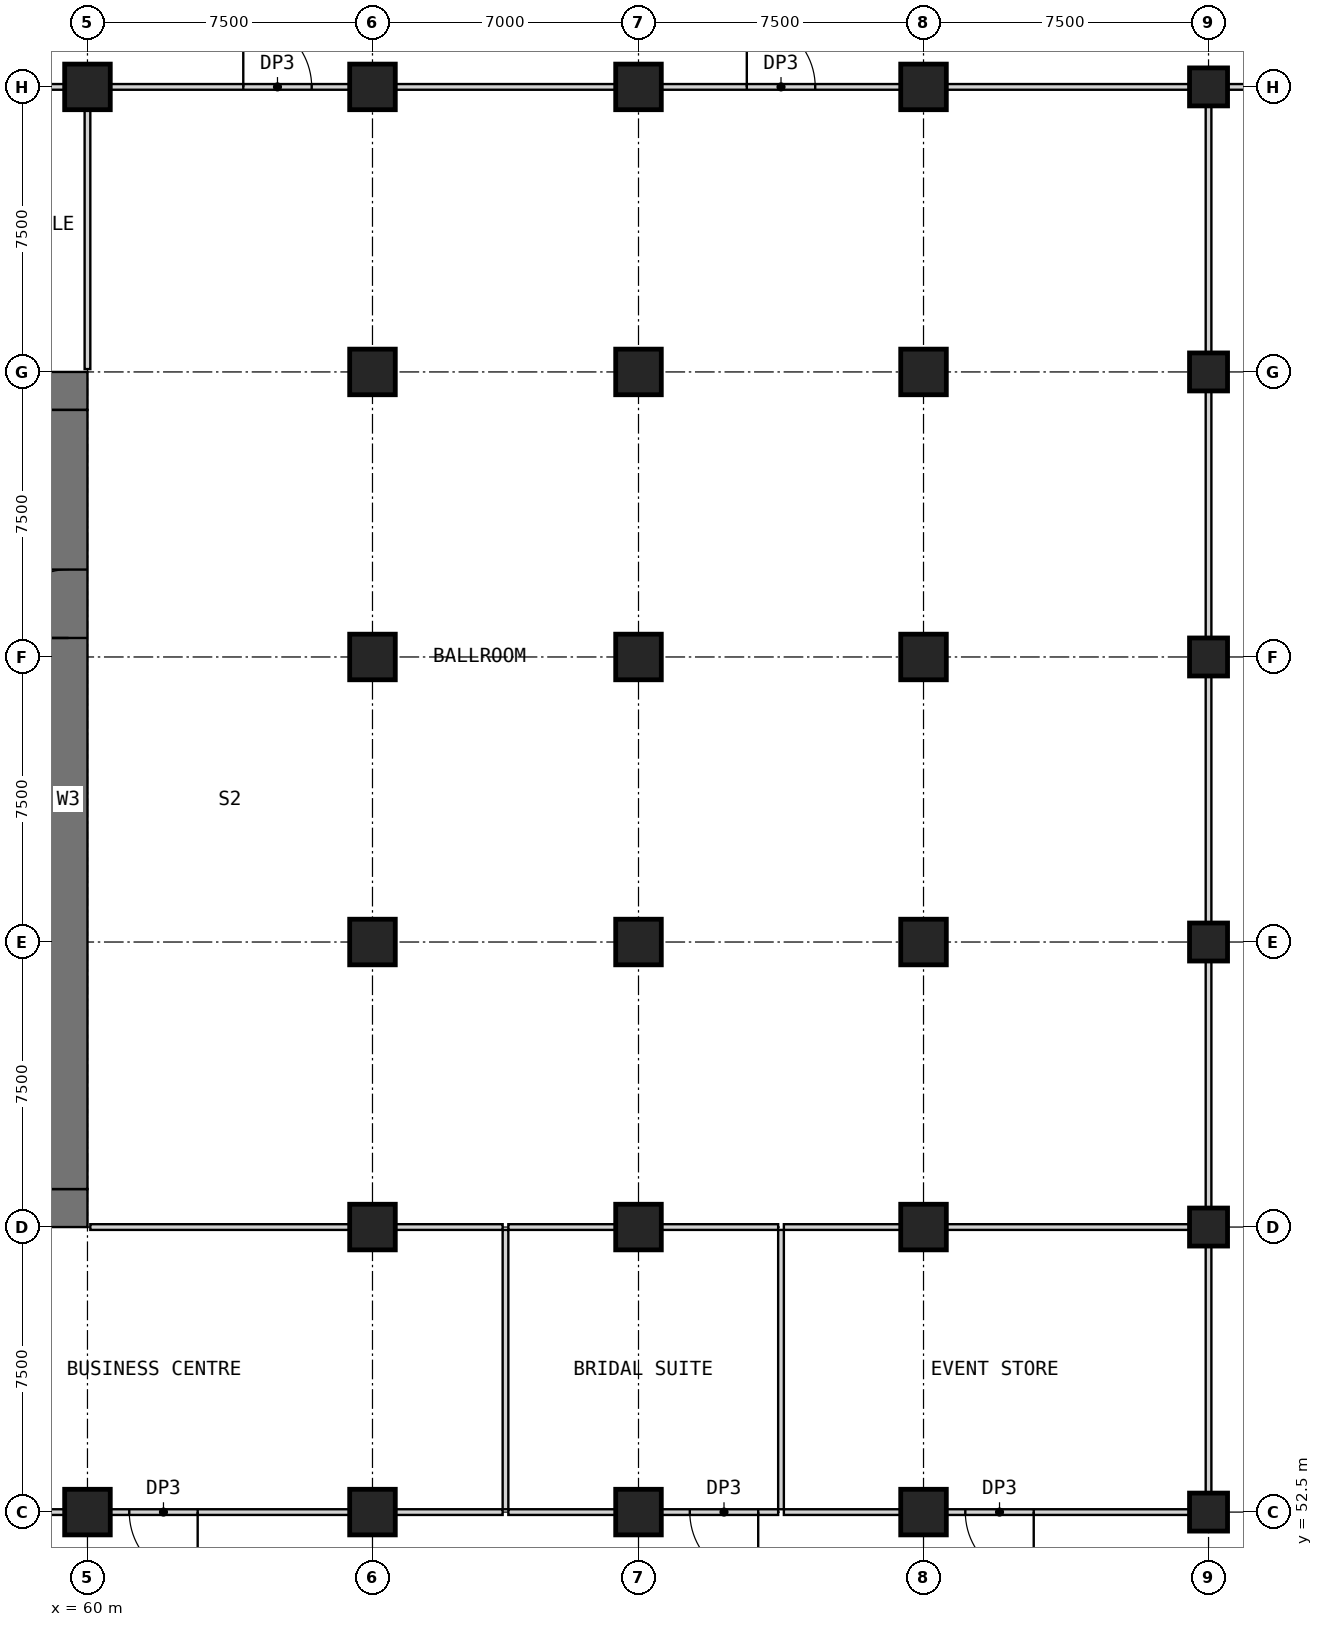
"""IFC4 building model, lengths in metres.
Left out: names, types, materials, properties, quantities, classifications, styles, units other than length and angle.
Written with IfcOpenShell. Run it as: python <this file> out.ifc"""

import sys

from ifc_helpers import new_model, si_unit, direction, frame, frame_2d, origin, origin_2d, place, context, subcontext, project, spatial, rectangle, extrude, element, fill, save


model = new_model("IFC4")
c1 = context("Model", 3, precision=1e-05, world=origin(), true_north=direction((0.0, 1.0)))
c2 = subcontext(c1, "Body", "Model", "MODEL_VIEW")
j1 = project(units=[si_unit("LENGTHUNIT", "METRE"), si_unit("PLANEANGLEUNIT", "RADIAN")], contexts=[c1])
p1 = place(None, origin())
s1 = spatial("IfcSite", under=j1, at=p1, CompositionType="ELEMENT")
p2 = place(p1, origin())
s2 = spatial("IfcBuilding", under=s1, at=p2, CompositionType="ELEMENT")
p3 = place(p2, frame((0.0, 0.0, 23.5)))
s3 = spatial("IfcBuildingStorey", under=s2, at=p3, CompositionType="ELEMENT", Elevation=23.5)
for number, where, z_axis, x_axis in (
    (1, (60.0, 52.5, 0.0), (0.0, 0.0, 1.0), (1.0, 0.0, 0.0)),
    (2, (60.0, 90.0, 0.0), (0.0, 0.0, 1.0), (1.0, 0.0, 0.0)),
    (3, (67.5, 52.5, 0.0), (0.0, 0.0, 1.0), (1.0, 0.0, 0.0)),
    (4, (67.5, 60.0, 0.0), (0.0, 0.0, 1.0), (1.0, 0.0, 0.0)),
    (5, (67.5, 67.5, 0.0), (0.0, 0.0, 1.0), (1.0, 0.0, 0.0)),
    (6, (67.5, 75.0, 0.0), (0.0, 0.0, 1.0), (1.0, 0.0, 0.0)),
    (7, (67.5, 82.5, 0.0), (0.0, 0.0, 1.0), (1.0, 0.0, 0.0)),
    (8, (67.5, 90.0, 0.0), (0.0, 0.0, 1.0), (1.0, 0.0, 0.0)),
    (9, (74.5, 52.5, 0.0), (0.0, 0.0, 1.0), (1.0, 0.0, 0.0)),
    (10, (74.5, 60.0, 0.0), (0.0, 0.0, 1.0), (1.0, 0.0, 0.0)),
    (11, (74.5, 67.5, 0.0), (0.0, 0.0, 1.0), (1.0, 0.0, 0.0)),
    (12, (74.5, 75.0, 0.0), (0.0, 0.0, 1.0), (1.0, 0.0, 0.0)),
    (13, (74.5, 82.5, 0.0), (0.0, 0.0, 1.0), (1.0, 0.0, 0.0)),
    (14, (74.5, 90.0, 0.0), (0.0, 0.0, 1.0), (1.0, 0.0, 0.0)),
    (15, (82.0, 52.5, 0.0), (0.0, 0.0, 1.0), (1.0, 0.0, 0.0)),
    (16, (82.0, 60.0, 0.0), (0.0, 0.0, 1.0), (1.0, 0.0, 0.0)),
    (17, (82.0, 67.5, 0.0), (0.0, 0.0, 1.0), (1.0, 0.0, 0.0)),
    (18, (82.0, 75.0, 0.0), (0.0, 0.0, 1.0), (1.0, 0.0, 0.0)),
    (19, (82.0, 82.5, 0.0), (0.0, 0.0, 1.0), (1.0, 0.0, 0.0)),
    (20, (82.0, 90.0, 0.0), (0.0, 0.0, 1.0), (1.0, 0.0, 0.0)),
):
    element("IfcColumn", number, at=place(p3, frame(where, z_axis=z_axis, x_axis=x_axis)), inside=s3, PredefinedType="COLUMN", context=c2, shape_type="SweptSolid", body=[
        extrude(rectangle(XDim=1.2, YDim=1.2, at=origin_2d()), origin(), (0.0, 0.0, 1.0), 5.5),
    ])
for number, where, z_axis, x_axis in (
    (21, (89.5, 52.5, 0.0), (0.0, 0.0, 1.0), (1.0, 0.0, 0.0)),
    (22, (89.5, 60.0, 0.0), (0.0, 0.0, 1.0), (1.0, 0.0, 0.0)),
    (23, (89.5, 67.5, 0.0), (0.0, 0.0, 1.0), (1.0, 0.0, 0.0)),
    (24, (89.5, 75.0, 0.0), (0.0, 0.0, 1.0), (1.0, 0.0, 0.0)),
    (25, (89.5, 82.5, 0.0), (0.0, 0.0, 1.0), (1.0, 0.0, 0.0)),
    (26, (89.5, 90.0, 0.0), (0.0, 0.0, 1.0), (1.0, 0.0, 0.0)),
):
    element("IfcColumn", number, at=place(p3, frame(where, z_axis=z_axis, x_axis=x_axis)), inside=s3, PredefinedType="COLUMN", context=c2, shape_type="SweptSolid", body=[
        extrude(rectangle(XDim=1.0, YDim=1.0, at=origin_2d()), origin(), (0.0, 0.0, 1.0), 5.5),
    ])
p4 = place(p3, frame((30.0, 60.5, 0.0), z_axis=(0.0, 0.0, 1.0), x_axis=(1.0, 0.0, 0.0)))
e27 = element("IfcWall", 27, at=p4, inside=s3, PredefinedType="SHEAR", context=c2, shape_type="SweptSolid", body=[
    extrude(rectangle(XDim=30.0, YDim=1.0, at=frame_2d((15.0, 0.0))), origin(), (0.0, 0.0, 1.0), 5.5),
])
p5 = place(p4, frame((21.9, 0.0, 0.0)))
e28 = element("IfcOpeningElement", 28, at=p5, cuts=e27, PredefinedType="OPENING", context=c2, shape_type="SweptSolid", body=[
    extrude(rectangle(XDim=1.8, YDim=2.1, at=frame_2d((0.9, 1.05))), frame((0.0, 0.51, 0.0), z_axis=(0.0, -1.0, 0.0), x_axis=(1.0, 0.0, 0.0)), (0.0, 0.0, 1.0), 1.02),
])
p6 = place(p4, frame((26.5, 0.0, 0.0)))
e29 = element("IfcOpeningElement", 29, at=p6, cuts=e27, PredefinedType="OPENING", context=c2, shape_type="SweptSolid", body=[
    extrude(rectangle(XDim=1.2, YDim=2.1, at=frame_2d((0.6, 1.05))), frame((0.0, 0.51, 0.0), z_axis=(0.0, -1.0, 0.0), x_axis=(1.0, 0.0, 0.0)), (0.0, 0.0, 1.0), 1.02),
])
p7 = place(p3, frame((30.0, 82.0, 0.0), z_axis=(0.0, 0.0, 1.0), x_axis=(1.0, 0.0, 0.0)))
e30 = element("IfcWall", 30, at=p7, inside=s3, PredefinedType="SHEAR", context=c2, shape_type="SweptSolid", body=[
    extrude(rectangle(XDim=30.0, YDim=1.0, at=frame_2d((15.0, 0.0))), origin(), (0.0, 0.0, 1.0), 5.5),
])
p8 = place(p3, frame((59.5, 61.0, 0.0), z_axis=(0.0, 0.0, 1.0), x_axis=(0.0, 1.0, 0.0)))
e31 = element("IfcWall", 31, at=p8, inside=s3, PredefinedType="SHEAR", context=c2, shape_type="SweptSolid", body=[
    extrude(rectangle(XDim=20.5, YDim=1.0, at=frame_2d((10.25, 0.0))), origin(), (0.0, 0.0, 1.0), 5.5),
])
p9 = place(p8, frame((14.5, 0.0, 0.0)))
e32 = element("IfcOpeningElement", 32, at=p9, cuts=e31, PredefinedType="OPENING", context=c2, shape_type="SweptSolid", body=[
    extrude(rectangle(XDim=1.8, YDim=2.1, at=frame_2d((0.9, 1.05))), frame((0.0, 0.51, 0.0), z_axis=(0.0, -1.0, 0.0), x_axis=(1.0, 0.0, 0.0)), (0.0, 0.0, 1.0), 1.02),
])
p10 = place(p3, frame((53.1, 52.5, 0.0), z_axis=(0.0, 0.0, 1.0), x_axis=(1.0, 0.0, 0.0)))
e33 = element("IfcWall", 33, at=p10, inside=s3, PredefinedType="PARTITIONING", context=c2, shape_type="SweptSolid", body=[
    extrude(rectangle(XDim=6.3, YDim=0.15, at=frame_2d((3.15, 0.0))), origin(), (0.0, 0.0, 1.0), 5.2),
])
p11 = place(p3, frame((66.9, 52.5, 0.0), z_axis=(0.0, 0.0, 1.0), x_axis=(-1.0, 0.0, 0.0)))
e34 = element("IfcWall", 34, at=p11, inside=s3, PredefinedType="PARTITIONING", context=c2, shape_type="SweptSolid", body=[
    extrude(rectangle(XDim=6.3, YDim=0.15, at=frame_2d((3.15, 0.0))), origin(), (0.0, 0.0, 1.0), 5.2),
])
p12 = place(p11, frame((4.0, 0.0, 0.0)))
e35 = element("IfcOpeningElement", 35, at=p12, cuts=e34, PredefinedType="OPENING", context=c2, shape_type="SweptSolid", body=[
    extrude(rectangle(XDim=1.8, YDim=2.4, at=frame_2d((0.9, 1.2))), frame((0.0, 0.085, 0.0), z_axis=(0.0, -1.0, 0.0), x_axis=(1.0, 0.0, 0.0)), (0.0, 0.0, 1.0), 0.17),
])
for number, where, z_axis, x_axis in (
    (36, (68.1, 52.5, 0.0), (0.0, 0.0, 1.0), (1.0, 0.0, 0.0)),
    (37, (71.075, 52.5, 0.0), (0.0, 0.0, 1.0), (1.0, 0.0, 0.0)),
):
    element("IfcWall", number, at=place(p3, frame(where, z_axis=z_axis, x_axis=x_axis)), inside=s3, PredefinedType="PARTITIONING", context=c2, shape_type="SweptSolid", body=[
        extrude(rectangle(XDim=2.825, YDim=0.15, at=frame_2d((1.413, 0.0))), origin(), (0.0, 0.0, 1.0), 5.2),
    ])
p13 = place(p3, frame((78.175, 52.5, 0.0), z_axis=(0.0, 0.0, 1.0), x_axis=(-1.0, 0.0, 0.0)))
e38 = element("IfcWall", 38, at=p13, inside=s3, PredefinedType="PARTITIONING", context=c2, shape_type="SweptSolid", body=[
    extrude(rectangle(XDim=3.075, YDim=0.15, at=frame_2d((1.538, 0.0))), origin(), (0.0, 0.0, 1.0), 5.2),
])
p14 = place(p13, frame((0.525, 0.0, 0.0)))
e39 = element("IfcOpeningElement", 39, at=p14, cuts=e38, PredefinedType="OPENING", context=c2, shape_type="SweptSolid", body=[
    extrude(rectangle(XDim=1.8, YDim=2.4, at=frame_2d((0.9, 1.2))), frame((0.0, 0.085, 0.0), z_axis=(0.0, -1.0, 0.0), x_axis=(1.0, 0.0, 0.0)), (0.0, 0.0, 1.0), 0.17),
])
p15 = place(p3, frame((78.325, 52.5, 0.0), z_axis=(0.0, 0.0, 1.0), x_axis=(1.0, 0.0, 0.0)))
e40 = element("IfcWall", 40, at=p15, inside=s3, PredefinedType="PARTITIONING", context=c2, shape_type="SweptSolid", body=[
    extrude(rectangle(XDim=3.075, YDim=0.15, at=frame_2d((1.538, 0.0))), origin(), (0.0, 0.0, 1.0), 5.2),
])
p16 = place(p3, frame((89.0, 52.5, 0.0), z_axis=(0.0, 0.0, 1.0), x_axis=(-1.0, 0.0, 0.0)))
e41 = element("IfcWall", 41, at=p16, inside=s3, PredefinedType="PARTITIONING", context=c2, shape_type="SweptSolid", body=[
    extrude(rectangle(XDim=6.4, YDim=0.15, at=frame_2d((3.2, 0.0))), origin(), (0.0, 0.0, 1.0), 5.2),
])
p17 = place(p16, frame((4.1, 0.0, 0.0)))
e42 = element("IfcOpeningElement", 42, at=p17, cuts=e41, PredefinedType="OPENING", context=c2, shape_type="SweptSolid", body=[
    extrude(rectangle(XDim=1.8, YDim=2.4, at=frame_2d((0.9, 1.2))), frame((0.0, 0.085, 0.0), z_axis=(0.0, -1.0, 0.0), x_axis=(1.0, 0.0, 0.0)), (0.0, 0.0, 1.0), 0.17),
])
p18 = place(p3, frame((60.075, 60.0, 0.0), z_axis=(0.0, 0.0, 1.0), x_axis=(1.0, 0.0, 0.0)))
e43 = element("IfcWall", 43, at=p18, inside=s3, PredefinedType="PARTITIONING", context=c2, shape_type="SweptSolid", body=[
    extrude(rectangle(XDim=6.825, YDim=0.15, at=frame_2d((3.413, 0.0))), origin(), (0.0, 0.0, 1.0), 5.2),
])
for number, where, z_axis, x_axis in (
    (44, (68.1, 60.0, 0.0), (0.0, 0.0, 1.0), (1.0, 0.0, 0.0)),
    (45, (71.075, 60.0, 0.0), (0.0, 0.0, 1.0), (1.0, 0.0, 0.0)),
):
    element("IfcWall", number, at=place(p3, frame(where, z_axis=z_axis, x_axis=x_axis)), inside=s3, PredefinedType="PARTITIONING", context=c2, shape_type="SweptSolid", body=[
        extrude(rectangle(XDim=2.825, YDim=0.15, at=frame_2d((1.413, 0.0))), origin(), (0.0, 0.0, 1.0), 5.2),
    ])
for number, where, z_axis, x_axis in (
    (46, (75.1, 60.0, 0.0), (0.0, 0.0, 1.0), (1.0, 0.0, 0.0)),
    (47, (78.325, 60.0, 0.0), (0.0, 0.0, 1.0), (1.0, 0.0, 0.0)),
):
    element("IfcWall", number, at=place(p3, frame(where, z_axis=z_axis, x_axis=x_axis)), inside=s3, PredefinedType="PARTITIONING", context=c2, shape_type="SweptSolid", body=[
        extrude(rectangle(XDim=3.075, YDim=0.15, at=frame_2d((1.538, 0.0))), origin(), (0.0, 0.0, 1.0), 5.2),
    ])
p19 = place(p3, frame((82.6, 60.0, 0.0), z_axis=(0.0, 0.0, 1.0), x_axis=(1.0, 0.0, 0.0)))
e48 = element("IfcWall", 48, at=p19, inside=s3, PredefinedType="PARTITIONING", context=c2, shape_type="SweptSolid", body=[
    extrude(rectangle(XDim=6.4, YDim=0.15, at=frame_2d((3.2, 0.0))), origin(), (0.0, 0.0, 1.0), 5.2),
])
p20 = place(p3, frame((56.325, 90.0, 0.0), z_axis=(0.0, 0.0, 1.0), x_axis=(1.0, 0.0, 0.0)))
e49 = element("IfcWall", 49, at=p20, inside=s3, PredefinedType="PARTITIONING", context=c2, shape_type="SweptSolid", body=[
    extrude(rectangle(XDim=3.075, YDim=0.15, at=frame_2d((1.538, 0.0))), origin(), (0.0, 0.0, 1.0), 5.2),
])
p21 = place(p20, frame((1.25, 0.0, 0.0)))
e50 = element("IfcOpeningElement", 50, at=p21, cuts=e49, PredefinedType="OPENING", context=c2, shape_type="SweptSolid", body=[
    extrude(rectangle(XDim=1.0, YDim=2.1, at=frame_2d((0.5, 1.05))), frame((0.0, 0.085, 0.0), z_axis=(0.0, -1.0, 0.0), x_axis=(1.0, 0.0, 0.0)), (0.0, 0.0, 1.0), 0.17),
])
p22 = place(p3, frame((60.6, 90.0, 0.0), z_axis=(0.0, 0.0, 1.0), x_axis=(1.0, 0.0, 0.0)))
e51 = element("IfcWall", 51, at=p22, inside=s3, PredefinedType="PARTITIONING", context=c2, shape_type="SweptSolid", body=[
    extrude(rectangle(XDim=6.3, YDim=0.15, at=frame_2d((3.15, 0.0))), origin(), (0.0, 0.0, 1.0), 5.2),
])
p23 = place(p22, frame((3.5, 0.0, 0.0)))
e52 = element("IfcOpeningElement", 52, at=p23, cuts=e51, PredefinedType="OPENING", context=c2, shape_type="SweptSolid", body=[
    extrude(rectangle(XDim=1.8, YDim=2.4, at=frame_2d((0.9, 1.2))), frame((0.0, 0.085, 0.0), z_axis=(0.0, -1.0, 0.0), x_axis=(1.0, 0.0, 0.0)), (0.0, 0.0, 1.0), 0.17),
])
p24 = place(p3, frame((68.1, 90.0, 0.0), z_axis=(0.0, 0.0, 1.0), x_axis=(1.0, 0.0, 0.0)))
e53 = element("IfcWall", 53, at=p24, inside=s3, PredefinedType="PARTITIONING", context=c2, shape_type="SweptSolid", body=[
    extrude(rectangle(XDim=5.8, YDim=0.15, at=frame_2d((2.9, 0.0))), origin(), (0.0, 0.0, 1.0), 5.2),
])
p25 = place(p3, frame((75.1, 90.0, 0.0), z_axis=(0.0, 0.0, 1.0), x_axis=(1.0, 0.0, 0.0)))
e54 = element("IfcWall", 54, at=p25, inside=s3, PredefinedType="PARTITIONING", context=c2, shape_type="SweptSolid", body=[
    extrude(rectangle(XDim=6.3, YDim=0.15, at=frame_2d((3.15, 0.0))), origin(), (0.0, 0.0, 1.0), 5.2),
])
p26 = place(p25, frame((2.25, 0.0, 0.0)))
e55 = element("IfcOpeningElement", 55, at=p26, cuts=e54, PredefinedType="OPENING", context=c2, shape_type="SweptSolid", body=[
    extrude(rectangle(XDim=1.8, YDim=2.4, at=frame_2d((0.9, 1.2))), frame((0.0, 0.085, 0.0), z_axis=(0.0, -1.0, 0.0), x_axis=(1.0, 0.0, 0.0)), (0.0, 0.0, 1.0), 0.17),
])
for number, where, z_axis, x_axis in (
    (56, (82.6, 90.0, 0.0), (0.0, 0.0, 1.0), (1.0, 0.0, 0.0)),
    (57, (90.0, 90.0, 0.0), (0.0, 0.0, 1.0), (1.0, 0.0, 0.0)),
):
    element("IfcWall", number, at=place(p3, frame(where, z_axis=z_axis, x_axis=x_axis)), inside=s3, PredefinedType="PARTITIONING", context=c2, shape_type="SweptSolid", body=[
        extrude(rectangle(XDim=6.4, YDim=0.15, at=frame_2d((3.2, 0.0))), origin(), (0.0, 0.0, 1.0), 5.2),
    ])
for number, where, z_axis, x_axis in (
    (58, (89.5, 53.0, 0.0), (0.0, 0.0, 1.0), (0.0, 1.0, 0.0)),
    (59, (89.5, 60.5, 0.0), (0.0, 0.0, 1.0), (0.0, 1.0, 0.0)),
    (60, (89.5, 68.0, 0.0), (0.0, 0.0, 1.0), (0.0, 1.0, 0.0)),
    (61, (89.5, 75.5, 0.0), (0.0, 0.0, 1.0), (0.0, 1.0, 0.0)),
    (62, (89.5, 83.0, 0.0), (0.0, 0.0, 1.0), (0.0, 1.0, 0.0)),
):
    element("IfcWall", number, at=place(p3, frame(where, z_axis=z_axis, x_axis=x_axis)), inside=s3, PredefinedType="PARTITIONING", context=c2, shape_type="SweptSolid", body=[
        extrude(rectangle(XDim=6.5, YDim=0.15, at=frame_2d((3.25, 0.0))), origin(), (0.0, 0.0, 1.0), 5.2),
    ])
for number, where, z_axis, x_axis in (
    (63, (71.0, 52.575, 0.0), (0.0, 0.0, 1.0), (0.0, 1.0, 0.0)),
    (64, (78.25, 52.575, 0.0), (0.0, 0.0, 1.0), (0.0, 1.0, 0.0)),
):
    element("IfcWall", number, at=place(p3, frame(where, z_axis=z_axis, x_axis=x_axis)), inside=s3, PredefinedType="PARTITIONING", context=c2, shape_type="SweptSolid", body=[
        extrude(rectangle(XDim=7.35, YDim=0.15, at=frame_2d((3.675, 0.0))), origin(), (0.0, 0.0, 1.0), 5.2),
    ])
p27 = place(p3, frame((60.0, 82.575, 0.0), z_axis=(0.0, 0.0, 1.0), x_axis=(0.0, 1.0, 0.0)))
e65 = element("IfcWall", 65, at=p27, inside=s3, PredefinedType="PARTITIONING", context=c2, shape_type="SweptSolid", body=[
    extrude(rectangle(XDim=6.825, YDim=0.15, at=frame_2d((3.413, 0.0))), origin(), (0.0, 0.0, 1.0), 5.2),
])
p28 = place(p9, origin())
e66 = element("IfcDoor", 66, at=p28, inside=s3, OperationType="DOUBLE_DOOR_SINGLE_SWING", PredefinedType="DOOR", context=c2, shape_type="SweptSolid", body=[
    extrude(rectangle(XDim=1.8, YDim=2.1, at=frame_2d((0.9, 1.05))), frame((0.0, 0.025, 0.0), z_axis=(0.0, -1.0, 0.0), x_axis=(1.0, 0.0, 0.0)), (0.0, 0.0, 1.0), 0.05),
])
fill(e32, e66)
p29 = place(p12, origin())
e67 = element("IfcDoor", 67, at=p29, inside=s3, OperationType="SINGLE_SWING_LEFT", PredefinedType="DOOR", context=c2, shape_type="SweptSolid", body=[
    extrude(rectangle(XDim=1.8, YDim=2.4, at=frame_2d((0.9, 1.2))), frame((0.0, 0.025, 0.0), z_axis=(0.0, -1.0, 0.0), x_axis=(1.0, 0.0, 0.0)), (0.0, 0.0, 1.0), 0.05),
])
fill(e35, e67)
p30 = place(p14, origin())
e68 = element("IfcDoor", 68, at=p30, inside=s3, OperationType="SINGLE_SWING_LEFT", PredefinedType="DOOR", context=c2, shape_type="SweptSolid", body=[
    extrude(rectangle(XDim=1.8, YDim=2.4, at=frame_2d((0.9, 1.2))), frame((0.0, 0.025, 0.0), z_axis=(0.0, -1.0, 0.0), x_axis=(1.0, 0.0, 0.0)), (0.0, 0.0, 1.0), 0.05),
])
fill(e39, e68)
p31 = place(p17, origin())
e69 = element("IfcDoor", 69, at=p31, inside=s3, OperationType="SINGLE_SWING_LEFT", PredefinedType="DOOR", context=c2, shape_type="SweptSolid", body=[
    extrude(rectangle(XDim=1.8, YDim=2.4, at=frame_2d((0.9, 1.2))), frame((0.0, 0.025, 0.0), z_axis=(0.0, -1.0, 0.0), x_axis=(1.0, 0.0, 0.0)), (0.0, 0.0, 1.0), 0.05),
])
fill(e42, e69)
p32 = place(p23, origin())
e70 = element("IfcDoor", 70, at=p32, inside=s3, OperationType="SINGLE_SWING_LEFT", PredefinedType="DOOR", context=c2, shape_type="SweptSolid", body=[
    extrude(rectangle(XDim=1.8, YDim=2.4, at=frame_2d((0.9, 1.2))), frame((0.0, 0.025, 0.0), z_axis=(0.0, -1.0, 0.0), x_axis=(1.0, 0.0, 0.0)), (0.0, 0.0, 1.0), 0.05),
])
fill(e52, e70)
p33 = place(p26, origin())
e71 = element("IfcDoor", 71, at=p33, inside=s3, OperationType="SINGLE_SWING_LEFT", PredefinedType="DOOR", context=c2, shape_type="SweptSolid", body=[
    extrude(rectangle(XDim=1.8, YDim=2.4, at=frame_2d((0.9, 1.2))), frame((0.0, 0.025, 0.0), z_axis=(0.0, -1.0, 0.0), x_axis=(1.0, 0.0, 0.0)), (0.0, 0.0, 1.0), 0.05),
])
fill(e55, e71)
save(model, sys.argv[1])
